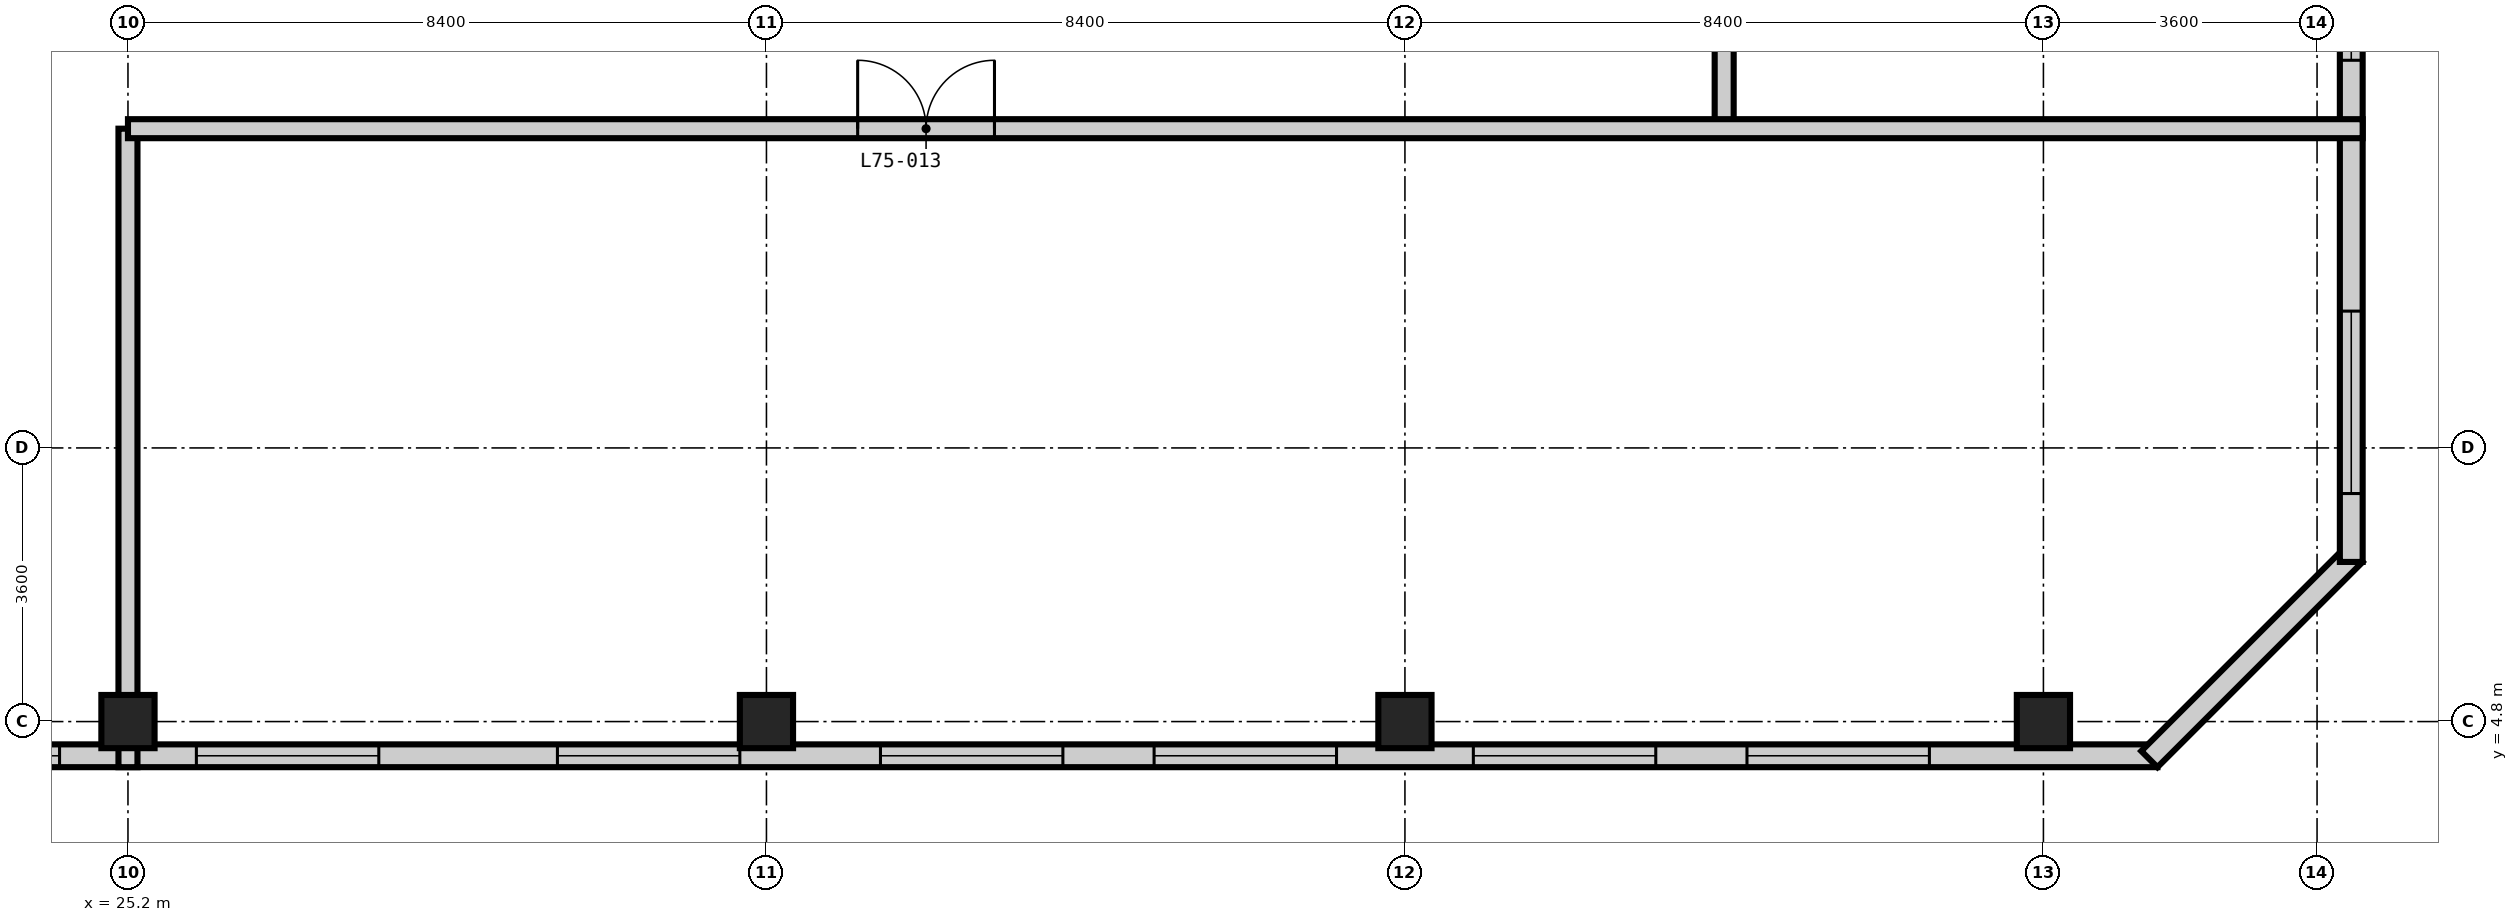
"""IFC4 building model, lengths in metres.
Left out: names, types, materials, properties, quantities, classifications, styles, units other than length and angle.
Written with IfcOpenShell. Run it as: python <this file> out.ifc"""

import sys

from ifc_helpers import new_model, si_unit, direction, frame, frame_2d, origin, origin_2d, place, context, subcontext, project, spatial, polyline, rectangle, hollow_rectangle, outline, extrude, element, fill, save


model = new_model("IFC4")
c1 = context("Model", 3, precision=1e-05, world=origin(), true_north=direction((0.0, 1.0)))
c2 = subcontext(c1, "Body", "Model", "MODEL_VIEW")
j1 = project(units=[si_unit("LENGTHUNIT", "METRE"), si_unit("PLANEANGLEUNIT", "RADIAN")], contexts=[c1])
p1 = place(None, origin())
s1 = spatial("IfcSite", under=j1, at=p1, CompositionType="ELEMENT")
p2 = place(p1, origin())
s2 = spatial("IfcBuilding", under=s1, at=p2, CompositionType="ELEMENT")
p3 = place(p2, frame((0.0, 0.0, 293.6)))
s3 = spatial("IfcBuildingStorey", under=s2, at=p3, CompositionType="ELEMENT", Elevation=293.6)
p4 = place(p3, frame((25.2, 4.8, -0.35), z_axis=(0.0, 0.0, 1.0), x_axis=(1.0, 0.0, 0.0)))
e1 = element("IfcColumn", 1, at=p4, inside=s3, PredefinedType="COLUMN", context=c2, shape_type="SweptSolid", body=[
    extrude(hollow_rectangle(XDim=0.7, YDim=0.7, WallThickness=0.06, at=origin_2d()), origin(), (0.0, 0.0, 1.0), 7.357),
])
p5 = place(p3, frame((33.6, 4.8, -0.35), z_axis=(0.0, 0.0, 1.0), x_axis=(1.0, 0.0, 0.0)))
e2 = element("IfcColumn", 2, at=p5, inside=s3, PredefinedType="COLUMN", context=c2, shape_type="SweptSolid", body=[
    extrude(hollow_rectangle(XDim=0.7, YDim=0.7, WallThickness=0.06, at=origin_2d()), origin(), (0.0, 0.0, 1.0), 9.607),
])
p6 = place(p3, frame((42.0, 4.8, -0.35), z_axis=(0.0, 0.0, 1.0), x_axis=(1.0, 0.0, 0.0)))
e3 = element("IfcColumn", 3, at=p6, inside=s3, PredefinedType="COLUMN", context=c2, shape_type="SweptSolid", body=[
    extrude(hollow_rectangle(XDim=0.7, YDim=0.7, WallThickness=0.06, at=origin_2d()), origin(), (0.0, 0.0, 1.0), 11.858),
])
p7 = place(p3, frame((50.4, 4.8, -0.35), z_axis=(0.0, 0.0, 1.0), x_axis=(1.0, 0.0, 0.0)))
e4 = element("IfcColumn", 4, at=p7, inside=s3, PredefinedType="COLUMN", context=c2, shape_type="SweptSolid", body=[
    extrude(hollow_rectangle(XDim=0.7, YDim=0.7, WallThickness=0.06, at=origin_2d()), origin(), (0.0, 0.0, 1.0), 14.109),
])
p8 = place(p3, frame((15.3, 4.35, 0.0), z_axis=(0.0, 0.0, 1.0), x_axis=(1.0, 0.0, 0.0)))
e5 = element("IfcWall", 5, at=p8, inside=s3, PredefinedType="SOLIDWALL", context=c2, shape_type="SweptSolid", body=[
    extrude(outline(polyline([(0.0, 0.0), (36.6, 0.0), (36.6, 14.771), (0.0, 4.965), (0.0, 0.0)])), frame((0.0, 0.15, 0.0), z_axis=(0.0, -1.0, 0.0), x_axis=(1.0, 0.0, 0.0)), (0.0, 0.0, 1.0), 0.3),
])
p9 = place(p8, frame((0.35, 0.0, 1.4)))
e6 = element("IfcOpeningElement", 6, at=p9, cuts=e5, PredefinedType="OPENING", context=c2, shape_type="SweptSolid", body=[
    extrude(rectangle(XDim=2.4, YDim=1.5, at=frame_2d((1.2, 0.75))), frame((0.0, 0.16, 0.0), z_axis=(0.0, -1.0, 0.0), x_axis=(1.0, 0.0, 0.0)), (0.0, 0.0, 1.0), 0.32),
])
p10 = place(p8, frame((6.6, 0.0, 0.6)))
e7 = element("IfcOpeningElement", 7, at=p10, cuts=e5, PredefinedType="OPENING", context=c2, shape_type="SweptSolid", body=[
    extrude(rectangle(XDim=2.4, YDim=1.5, at=frame_2d((1.2, 0.75))), frame((0.0, 0.16, 0.0), z_axis=(0.0, -1.0, 0.0), x_axis=(1.0, 0.0, 0.0)), (0.0, 0.0, 1.0), 0.32),
])
p11 = place(p8, frame((10.8, 0.0, 0.6)))
e8 = element("IfcOpeningElement", 8, at=p11, cuts=e5, PredefinedType="OPENING", context=c2, shape_type="SweptSolid", body=[
    extrude(rectangle(XDim=2.4, YDim=1.5, at=frame_2d((1.2, 0.75))), frame((0.0, 0.16, 0.0), z_axis=(0.0, -1.0, 0.0), x_axis=(1.0, 0.0, 0.0)), (0.0, 0.0, 1.0), 0.32),
])
p12 = place(p8, frame((15.55, 0.0, 2.6)))
e9 = element("IfcOpeningElement", 9, at=p12, cuts=e5, PredefinedType="OPENING", context=c2, shape_type="SweptSolid", body=[
    extrude(rectangle(XDim=2.4, YDim=1.5, at=frame_2d((1.2, 0.75))), frame((0.0, 0.16, 0.0), z_axis=(0.0, -1.0, 0.0), x_axis=(1.0, 0.0, 0.0)), (0.0, 0.0, 1.0), 0.32),
])
p13 = place(p8, frame((19.8, 0.0, 0.6)))
e10 = element("IfcOpeningElement", 10, at=p13, cuts=e5, PredefinedType="OPENING", context=c2, shape_type="SweptSolid", body=[
    extrude(rectangle(XDim=2.4, YDim=1.5, at=frame_2d((1.2, 0.75))), frame((0.0, 0.16, 0.0), z_axis=(0.0, -1.0, 0.0), x_axis=(1.0, 0.0, 0.0)), (0.0, 0.0, 1.0), 0.32),
])
p14 = place(p8, frame((23.4, 0.0, 0.6)))
e11 = element("IfcOpeningElement", 11, at=p14, cuts=e5, PredefinedType="OPENING", context=c2, shape_type="SweptSolid", body=[
    extrude(rectangle(XDim=2.4, YDim=1.5, at=frame_2d((1.2, 0.75))), frame((0.0, 0.16, 0.0), z_axis=(0.0, -1.0, 0.0), x_axis=(1.0, 0.0, 0.0)), (0.0, 0.0, 1.0), 0.32),
])
p15 = place(p8, frame((27.6, 0.0, 0.6)))
e12 = element("IfcOpeningElement", 12, at=p15, cuts=e5, PredefinedType="OPENING", context=c2, shape_type="SweptSolid", body=[
    extrude(rectangle(XDim=2.4, YDim=1.5, at=frame_2d((1.2, 0.75))), frame((0.0, 0.16, 0.0), z_axis=(0.0, -1.0, 0.0), x_axis=(1.0, 0.0, 0.0)), (0.0, 0.0, 1.0), 0.32),
])
p16 = place(p8, frame((31.2, 0.0, 0.6)))
e13 = element("IfcOpeningElement", 13, at=p16, cuts=e5, PredefinedType="OPENING", context=c2, shape_type="SweptSolid", body=[
    extrude(rectangle(XDim=2.4, YDim=1.5, at=frame_2d((1.2, 0.75))), frame((0.0, 0.16, 0.0), z_axis=(0.0, -1.0, 0.0), x_axis=(1.0, 0.0, 0.0)), (0.0, 0.0, 1.0), 0.32),
])
p17 = place(p3, frame((51.794, 4.306, 0.0), z_axis=(0.0, 0.0, 1.0), x_axis=(0.707074812166, 0.707138748762, 0.0)))
e14 = element("IfcWall", 14, at=p17, inside=s3, PredefinedType="SOLIDWALL", context=c2, shape_type="SweptSolid", body=[
    extrude(outline(polyline([(0.0, 0.0), (3.818, 0.0), (3.818, 15.467), (0.0, 14.743), (0.0, 0.0)])), frame((0.0, 0.15, 0.0), z_axis=(0.0, -1.0, 0.0), x_axis=(1.0, 0.0, 0.0)), (0.0, 0.0, 1.0), 0.3),
])
p18 = place(p3, frame((54.45, 6.9, 0.0), z_axis=(0.0, 0.0, 1.0), x_axis=(0.0, 1.0, 0.0)))
e15 = element("IfcWall", 15, at=p18, inside=s3, PredefinedType="SOLIDWALL", context=c2, shape_type="SweptSolid", body=[
    extrude(outline(polyline([(0.0, 0.0), (45.0, 0.0), (45.0, 15.455), (0.0, 15.455), (0.0, 0.0)])), frame((0.0, 0.15, 0.0), z_axis=(0.0, -1.0, 0.0), x_axis=(1.0, 0.0, 0.0)), (0.0, 0.0, 1.0), 0.3),
])
p19 = place(p18, frame((0.9, 0.0, 0.6)))
e16 = element("IfcOpeningElement", 16, at=p19, cuts=e15, PredefinedType="OPENING", context=c2, shape_type="SweptSolid", body=[
    extrude(rectangle(XDim=2.4, YDim=1.5, at=frame_2d((1.2, 0.75))), frame((0.0, 0.16, 0.0), z_axis=(0.0, -1.0, 0.0), x_axis=(1.0, 0.0, 0.0)), (0.0, 0.0, 1.0), 0.32),
])
p20 = place(p18, frame((6.6, 0.0, 0.6)))
e17 = element("IfcOpeningElement", 17, at=p20, cuts=e15, PredefinedType="OPENING", context=c2, shape_type="SweptSolid", body=[
    extrude(rectangle(XDim=2.4, YDim=1.5, at=frame_2d((1.2, 0.75))), frame((0.0, 0.16, 0.0), z_axis=(0.0, -1.0, 0.0), x_axis=(1.0, 0.0, 0.0)), (0.0, 0.0, 1.0), 0.32),
])
p21 = place(p18, frame((11.1, 0.0, 0.6)))
e18 = element("IfcOpeningElement", 18, at=p21, cuts=e15, PredefinedType="OPENING", context=c2, shape_type="SweptSolid", body=[
    extrude(rectangle(XDim=2.4, YDim=1.5, at=frame_2d((1.2, 0.75))), frame((0.0, 0.16, 0.0), z_axis=(0.0, -1.0, 0.0), x_axis=(1.0, 0.0, 0.0)), (0.0, 0.0, 1.0), 0.32),
])
p22 = place(p18, frame((15.0, 0.0, 0.6)))
e19 = element("IfcOpeningElement", 19, at=p22, cuts=e15, PredefinedType="OPENING", context=c2, shape_type="SweptSolid", body=[
    extrude(rectangle(XDim=2.4, YDim=1.5, at=frame_2d((1.2, 0.75))), frame((0.0, 0.16, 0.0), z_axis=(0.0, -1.0, 0.0), x_axis=(1.0, 0.0, 0.0)), (0.0, 0.0, 1.0), 0.32),
])
p23 = place(p18, frame((19.2, 0.0, 0.6)))
e20 = element("IfcOpeningElement", 20, at=p23, cuts=e15, PredefinedType="OPENING", context=c2, shape_type="SweptSolid", body=[
    extrude(rectangle(XDim=2.4, YDim=1.5, at=frame_2d((1.2, 0.75))), frame((0.0, 0.16, 0.0), z_axis=(0.0, -1.0, 0.0), x_axis=(1.0, 0.0, 0.0)), (0.0, 0.0, 1.0), 0.32),
])
p24 = place(p18, frame((23.1, 0.0, 0.6)))
e21 = element("IfcOpeningElement", 21, at=p24, cuts=e15, PredefinedType="OPENING", context=c2, shape_type="SweptSolid", body=[
    extrude(rectangle(XDim=2.4, YDim=1.5, at=frame_2d((1.2, 0.75))), frame((0.0, 0.16, 0.0), z_axis=(0.0, -1.0, 0.0), x_axis=(1.0, 0.0, 0.0)), (0.0, 0.0, 1.0), 0.32),
])
p25 = place(p18, frame((27.9, 0.0, 0.6)))
e22 = element("IfcOpeningElement", 22, at=p25, cuts=e15, PredefinedType="OPENING", context=c2, shape_type="SweptSolid", body=[
    extrude(rectangle(XDim=2.4, YDim=1.5, at=frame_2d((1.2, 0.75))), frame((0.0, 0.16, 0.0), z_axis=(0.0, -1.0, 0.0), x_axis=(1.0, 0.0, 0.0)), (0.0, 0.0, 1.0), 0.32),
])
p26 = place(p18, frame((31.8, 0.0, 0.6)))
e23 = element("IfcOpeningElement", 23, at=p26, cuts=e15, PredefinedType="OPENING", context=c2, shape_type="SweptSolid", body=[
    extrude(rectangle(XDim=2.4, YDim=1.5, at=frame_2d((1.2, 0.75))), frame((0.0, 0.16, 0.0), z_axis=(0.0, -1.0, 0.0), x_axis=(1.0, 0.0, 0.0)), (0.0, 0.0, 1.0), 0.32),
])
p27 = place(p18, frame((36.0, 0.0, 0.6)))
e24 = element("IfcOpeningElement", 24, at=p27, cuts=e15, PredefinedType="OPENING", context=c2, shape_type="SweptSolid", body=[
    extrude(rectangle(XDim=2.4, YDim=1.5, at=frame_2d((1.2, 0.75))), frame((0.0, 0.16, 0.0), z_axis=(0.0, -1.0, 0.0), x_axis=(1.0, 0.0, 0.0)), (0.0, 0.0, 1.0), 0.32),
])
p28 = place(p18, frame((40.2, 0.0, 0.6)))
e25 = element("IfcOpeningElement", 25, at=p28, cuts=e15, PredefinedType="OPENING", context=c2, shape_type="SweptSolid", body=[
    extrude(rectangle(XDim=2.4, YDim=1.5, at=frame_2d((1.2, 0.75))), frame((0.0, 0.16, 0.0), z_axis=(0.0, -1.0, 0.0), x_axis=(1.0, 0.0, 0.0)), (0.0, 0.0, 1.0), 0.32),
])
p29 = place(p3, frame((25.2, 4.2, 0.0), z_axis=(0.0, 0.0, 1.0), x_axis=(0.0, 1.0, 0.0)))
e26 = element("IfcWall", 26, at=p29, inside=s3, PredefinedType="PARTITIONING", context=c2, shape_type="SweptSolid", body=[
    extrude(outline(polyline([(0.0, 0.0), (8.4, 0.0), (8.4, 7.617), (0.0, 7.617), (0.0, 0.0)])), frame((0.0, 0.125, 0.0), z_axis=(0.0, -1.0, 0.0), x_axis=(1.0, 0.0, 0.0)), (0.0, 0.0, 1.0), 0.25),
])
p30 = place(p3, frame((46.2, 12.6, 0.0), z_axis=(0.0, 0.0, 1.0), x_axis=(0.0, 1.0, 0.0)))
e27 = element("IfcWall", 27, at=p30, inside=s3, PredefinedType="PARTITIONING", context=c2, shape_type="SweptSolid", body=[
    extrude(outline(polyline([(0.0, 0.0), (33.6, 0.0), (33.6, 13.244), (0.0, 13.244), (0.0, 0.0)])), frame((0.0, 0.125, 0.0), z_axis=(0.0, -1.0, 0.0), x_axis=(1.0, 0.0, 0.0)), (0.0, 0.0, 1.0), 0.25),
])
p31 = place(p30, frame((15.9, 0.0, 0.0)))
e28 = element("IfcOpeningElement", 28, at=p31, cuts=e27, PredefinedType="OPENING", context=c2, shape_type="SweptSolid", body=[
    extrude(rectangle(XDim=1.8, YDim=2.4, at=frame_2d((0.9, 1.2))), frame((0.0, 0.135, 0.0), z_axis=(0.0, -1.0, 0.0), x_axis=(1.0, 0.0, 0.0)), (0.0, 0.0, 1.0), 0.27),
])
p32 = place(p3, frame((25.2, 12.6, 0.0), z_axis=(0.0, 0.0, 1.0), x_axis=(1.0, 0.0, 0.0)))
e29 = element("IfcWall", 29, at=p32, inside=s3, PredefinedType="PARTITIONING", context=c2, shape_type="SweptSolid", body=[
    extrude(outline(polyline([(0.0, 0.0), (29.4, 0.0), (29.4, 15.495), (0.0, 7.617), (0.0, 0.0)])), frame((0.0, 0.125, 0.0), z_axis=(0.0, -1.0, 0.0), x_axis=(1.0, 0.0, 0.0)), (0.0, 0.0, 1.0), 0.25),
])
p33 = place(p32, frame((9.6, 0.0, 0.0)))
e30 = element("IfcOpeningElement", 30, at=p33, cuts=e29, PredefinedType="OPENING", context=c2, shape_type="SweptSolid", body=[
    extrude(rectangle(XDim=1.8, YDim=2.4, at=frame_2d((0.9, 1.2))), frame((0.0, 0.135, 0.0), z_axis=(0.0, -1.0, 0.0), x_axis=(1.0, 0.0, 0.0)), (0.0, 0.0, 1.0), 0.27),
])
p34 = place(p10, origin())
e31 = element("IfcWindow", 31, at=p34, inside=s3, PartitioningType="SINGLE_PANEL", PredefinedType="WINDOW", context=c2, shape_type="SweptSolid", body=[
    extrude(rectangle(XDim=2.4, YDim=1.5, at=frame_2d((1.2, 0.75))), frame((0.0, 0.03, 0.0), z_axis=(0.0, -1.0, 0.0), x_axis=(1.0, 0.0, 0.0)), (0.0, 0.0, 1.0), 0.06),
])
fill(e7, e31)
p35 = place(p11, origin())
e32 = element("IfcWindow", 32, at=p35, inside=s3, PartitioningType="SINGLE_PANEL", PredefinedType="WINDOW", context=c2, shape_type="SweptSolid", body=[
    extrude(rectangle(XDim=2.4, YDim=1.5, at=frame_2d((1.2, 0.75))), frame((0.0, 0.03, 0.0), z_axis=(0.0, -1.0, 0.0), x_axis=(1.0, 0.0, 0.0)), (0.0, 0.0, 1.0), 0.06),
])
fill(e8, e32)
p36 = place(p12, origin())
e33 = element("IfcWindow", 33, at=p36, inside=s3, PartitioningType="SINGLE_PANEL", PredefinedType="WINDOW", context=c2, shape_type="SweptSolid", body=[
    extrude(rectangle(XDim=2.4, YDim=1.5, at=frame_2d((1.2, 0.75))), frame((0.0, 0.03, 0.0), z_axis=(0.0, -1.0, 0.0), x_axis=(1.0, 0.0, 0.0)), (0.0, 0.0, 1.0), 0.06),
])
fill(e9, e33)
p37 = place(p13, origin())
e34 = element("IfcWindow", 34, at=p37, inside=s3, PartitioningType="SINGLE_PANEL", PredefinedType="WINDOW", context=c2, shape_type="SweptSolid", body=[
    extrude(rectangle(XDim=2.4, YDim=1.5, at=frame_2d((1.2, 0.75))), frame((0.0, 0.03, 0.0), z_axis=(0.0, -1.0, 0.0), x_axis=(1.0, 0.0, 0.0)), (0.0, 0.0, 1.0), 0.06),
])
fill(e10, e34)
p38 = place(p14, origin())
e35 = element("IfcWindow", 35, at=p38, inside=s3, PartitioningType="SINGLE_PANEL", PredefinedType="WINDOW", context=c2, shape_type="SweptSolid", body=[
    extrude(rectangle(XDim=2.4, YDim=1.5, at=frame_2d((1.2, 0.75))), frame((0.0, 0.03, 0.0), z_axis=(0.0, -1.0, 0.0), x_axis=(1.0, 0.0, 0.0)), (0.0, 0.0, 1.0), 0.06),
])
fill(e11, e35)
p39 = place(p15, origin())
e36 = element("IfcWindow", 36, at=p39, inside=s3, PartitioningType="SINGLE_PANEL", PredefinedType="WINDOW", context=c2, shape_type="SweptSolid", body=[
    extrude(rectangle(XDim=2.4, YDim=1.5, at=frame_2d((1.2, 0.75))), frame((0.0, 0.03, 0.0), z_axis=(0.0, -1.0, 0.0), x_axis=(1.0, 0.0, 0.0)), (0.0, 0.0, 1.0), 0.06),
])
fill(e12, e36)
p40 = place(p16, origin())
e37 = element("IfcWindow", 37, at=p40, inside=s3, PartitioningType="SINGLE_PANEL", PredefinedType="WINDOW", context=c2, shape_type="SweptSolid", body=[
    extrude(rectangle(XDim=2.4, YDim=1.5, at=frame_2d((1.2, 0.75))), frame((0.0, 0.03, 0.0), z_axis=(0.0, -1.0, 0.0), x_axis=(1.0, 0.0, 0.0)), (0.0, 0.0, 1.0), 0.06),
])
fill(e13, e37)
p41 = place(p19, origin())
e38 = element("IfcWindow", 38, at=p41, inside=s3, PartitioningType="SINGLE_PANEL", PredefinedType="WINDOW", context=c2, shape_type="SweptSolid", body=[
    extrude(rectangle(XDim=2.4, YDim=1.5, at=frame_2d((1.2, 0.75))), frame((0.0, 0.03, 0.0), z_axis=(0.0, -1.0, 0.0), x_axis=(1.0, 0.0, 0.0)), (0.0, 0.0, 1.0), 0.06),
])
fill(e16, e38)
p42 = place(p20, origin())
e39 = element("IfcWindow", 39, at=p42, inside=s3, PartitioningType="SINGLE_PANEL", PredefinedType="WINDOW", context=c2, shape_type="SweptSolid", body=[
    extrude(rectangle(XDim=2.4, YDim=1.5, at=frame_2d((1.2, 0.75))), frame((0.0, 0.03, 0.0), z_axis=(0.0, -1.0, 0.0), x_axis=(1.0, 0.0, 0.0)), (0.0, 0.0, 1.0), 0.06),
])
fill(e17, e39)
p43 = place(p33, origin())
e40 = element("IfcDoor", 40, at=p43, inside=s3, OperationType="DOUBLE_DOOR_DOUBLE_SWING", PredefinedType="DOOR", context=c2, shape_type="SweptSolid", body=[
    extrude(rectangle(XDim=1.8, YDim=2.4, at=frame_2d((0.9, 1.2))), frame((0.0, 0.025, 0.0), z_axis=(0.0, -1.0, 0.0), x_axis=(1.0, 0.0, 0.0)), (0.0, 0.0, 1.0), 0.05),
])
fill(e30, e40)
save(model, sys.argv[1])
